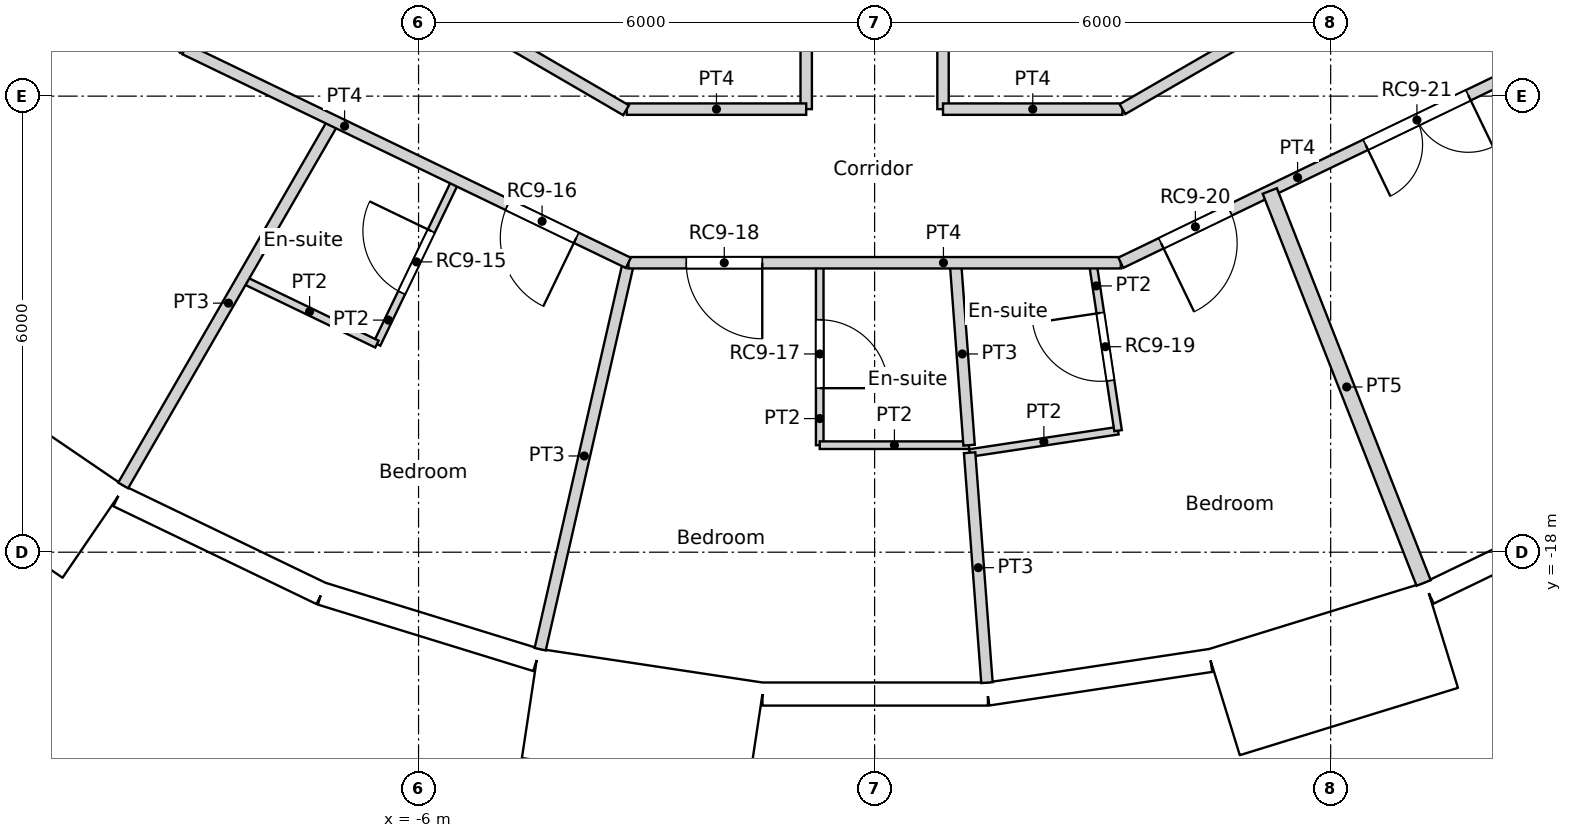
"""IFC4 building model, lengths in metres.
Left out: names, types, materials, properties, quantities, classifications, styles, units other than length and angle.
Written with IfcOpenShell. Run it as: python <this file> out.ifc"""

import sys

from ifc_helpers import new_model, si_unit, direction, frame, frame_2d, origin, origin_2d, place, context, subcontext, project, spatial, rectangle, circle, extrude, element, fill, save


model = new_model("IFC4")
c1 = context("Model", 3, precision=1e-05, world=origin(), true_north=direction((0.0, 1.0)))
c2 = subcontext(c1, "Body", "Model", "MODEL_VIEW")
j1 = project(units=[si_unit("LENGTHUNIT", "METRE"), si_unit("PLANEANGLEUNIT", "RADIAN")], contexts=[c1])
p1 = place(None, origin())
s1 = spatial("IfcSite", under=j1, at=p1, CompositionType="ELEMENT")
p2 = place(p1, origin())
s2 = spatial("IfcBuilding", under=s1, at=p2, CompositionType="ELEMENT")
p3 = place(p2, frame((0.0, 0.0, 316.2)))
s3 = spatial("IfcBuildingStorey", under=s2, at=p3, CompositionType="ELEMENT", Elevation=316.2)
for number, where, z_axis, x_axis in (
    (1, (-9.411, -16.301, 0.0), (0.0, 0.0, 1.0), (1.0, 0.0, 0.0)),
    (2, (-4.188, -18.35, 0.0), (0.0, 0.0, 1.0), (1.0, 0.0, 0.0)),
    (3, (1.406, -18.77, 0.0), (0.0, 0.0, 1.0), (1.0, 0.0, 0.0)),
    (4, (6.876, -17.521, 0.0), (0.0, 0.0, 1.0), (1.0, 0.0, 0.0)),
):
    element("IfcColumn", number, at=place(p3, frame(where, z_axis=z_axis, x_axis=x_axis)), inside=s3, PredefinedType="COLUMN", context=c2, shape_type="SweptSolid", body=[
        extrude(circle(Radius=0.45, at=origin_2d()), origin(), (0.0, 0.0, 1.0), 3.6),
    ])
p4 = place(p3, frame((-12.754, -16.044, -0.35), z_axis=(0.0, 0.0, 1.0), x_axis=(0.826246281157, -0.563309047392, 0.0)))
e5 = element("IfcWall", 5, at=p4, inside=s3, PredefinedType="ELEMENTEDWALL", context=c2, shape_type="SweptSolid", body=[
    extrude(rectangle(XDim=3.0, YDim=1.45, at=frame_2d((1.5, 0.0))), origin(), (0.0, 0.0, 1.0), 3.6),
])
p5 = place(p4, frame((1.5, 0.0, 1.9)))
e6 = element("IfcOpeningElement", 6, at=p5, cuts=e5, PredefinedType="OPENING", context=c2, shape_type="SweptSolid", body=[
    extrude(circle(Radius=0.9, at=origin_2d()), frame((0.0, 0.735, 0.0), z_axis=(0.0, -1.0, 0.0), x_axis=(1.0, 0.0, 0.0)), (0.0, 0.0, 1.0), 1.47),
])
p6 = place(p3, frame((-9.947, -17.259, 0.0), z_axis=(0.0, 0.0, 1.0), x_axis=(0.900939615635, -0.433944476838, 0.0)))
e7 = element("IfcWall", 7, at=p6, inside=s3, PredefinedType="SOLIDWALL", context=c2, shape_type="SweptSolid", body=[
    extrude(rectangle(XDim=2.962, YDim=0.3, at=frame_2d((1.481, 0.0))), origin(), (0.0, 0.0, 1.0), 3.25),
])
p7 = place(p6, frame((1.481, 0.0, 1.55)))
e8 = element("IfcOpeningElement", 8, at=p7, cuts=e7, PredefinedType="OPENING", context=c2, shape_type="SweptSolid", body=[
    extrude(circle(Radius=0.9, at=origin_2d()), frame((0.0, 0.16, 0.0), z_axis=(0.0, -1.0, 0.0), x_axis=(1.0, 0.0, 0.0)), (0.0, 0.0, 1.0), 0.32),
])
p8 = place(p3, frame((-7.278, -18.545, 0.0), z_axis=(0.0, 0.0, 1.0), x_axis=(0.95558635705, -0.294711238707, 0.0)))
e9 = element("IfcWall", 9, at=p8, inside=s3, PredefinedType="SOLIDWALL", context=c2, shape_type="SweptSolid", body=[
    extrude(rectangle(XDim=2.962, YDim=0.3, at=frame_2d((1.481, 0.0))), origin(), (0.0, 0.0, 1.0), 3.25),
])
p9 = place(p8, frame((1.481, 0.0, 1.55)))
e10 = element("IfcOpeningElement", 10, at=p9, cuts=e9, PredefinedType="OPENING", context=c2, shape_type="SweptSolid", body=[
    extrude(circle(Radius=0.9, at=origin_2d()), frame((0.0, 0.16, 0.0), z_axis=(0.0, -1.0, 0.0), x_axis=(1.0, 0.0, 0.0)), (0.0, 0.0, 1.0), 0.32),
])
p10 = place(p3, frame((-4.53, -19.989, -0.35), z_axis=(0.0, 0.0, 1.0), x_axis=(0.988836445254, -0.149004981587, 0.0)))
e11 = element("IfcWall", 11, at=p10, inside=s3, PredefinedType="ELEMENTEDWALL", context=c2, shape_type="SweptSolid", body=[
    extrude(rectangle(XDim=3.0, YDim=1.45, at=frame_2d((1.5, 0.0))), origin(), (0.0, 0.0, 1.0), 3.6),
])
p11 = place(p10, frame((1.5, 0.0, 1.9)))
e12 = element("IfcOpeningElement", 12, at=p11, cuts=e11, PredefinedType="OPENING", context=c2, shape_type="SweptSolid", body=[
    extrude(circle(Radius=0.9, at=origin_2d()), frame((0.0, 0.735, 0.0), z_axis=(0.0, -1.0, 0.0), x_axis=(1.0, 0.0, 0.0)), (0.0, 0.0, 1.0), 1.47),
])
p12 = place(p3, frame((-1.473, -19.866, 0.0), z_axis=(0.0, 0.0, 1.0), x_axis=(1.0, 0.0, 0.0)))
e13 = element("IfcWall", 13, at=p12, inside=s3, PredefinedType="SOLIDWALL", context=c2, shape_type="SweptSolid", body=[
    extrude(rectangle(XDim=2.962, YDim=0.3, at=frame_2d((1.481, 0.0))), origin(), (0.0, 0.0, 1.0), 3.25),
])
p13 = place(p12, frame((1.481, 0.0, 1.55)))
e14 = element("IfcOpeningElement", 14, at=p13, cuts=e13, PredefinedType="OPENING", context=c2, shape_type="SweptSolid", body=[
    extrude(circle(Radius=0.9, at=origin_2d()), frame((0.0, 0.16, 0.0), z_axis=(0.0, -1.0, 0.0), x_axis=(1.0, 0.0, 0.0)), (0.0, 0.0, 1.0), 0.32),
])
p14 = place(p3, frame((1.489, -19.866, 0.0), z_axis=(0.0, 0.0, 1.0), x_axis=(0.988835775663, 0.149009425104, 0.0)))
e15 = element("IfcWall", 15, at=p14, inside=s3, PredefinedType="SOLIDWALL", context=c2, shape_type="SweptSolid", body=[
    extrude(rectangle(XDim=2.962, YDim=0.3, at=frame_2d((1.481, 0.0))), origin(), (0.0, 0.0, 1.0), 3.25),
])
p15 = place(p14, frame((1.481, 0.0, 1.55)))
e16 = element("IfcOpeningElement", 16, at=p15, cuts=e15, PredefinedType="OPENING", context=c2, shape_type="SweptSolid", body=[
    extrude(circle(Radius=0.9, at=origin_2d()), frame((0.0, 0.16, 0.0), z_axis=(0.0, -1.0, 0.0), x_axis=(1.0, 0.0, 0.0)), (0.0, 0.0, 1.0), 0.32),
])
p16 = place(p3, frame((4.592, -19.975, -0.35), z_axis=(0.0, 0.0, 1.0), x_axis=(0.955571139978, 0.294760574774, 0.0)))
e17 = element("IfcWall", 17, at=p16, inside=s3, PredefinedType="ELEMENTEDWALL", context=c2, shape_type="SweptSolid", body=[
    extrude(rectangle(XDim=3.0, YDim=1.45, at=frame_2d((1.5, 0.0))), origin(), (0.0, 0.0, 1.0), 3.6),
])
p17 = place(p16, frame((1.5, 0.0, 1.9)))
e18 = element("IfcOpeningElement", 18, at=p17, cuts=e17, PredefinedType="OPENING", context=c2, shape_type="SweptSolid", body=[
    extrude(circle(Radius=0.9, at=origin_2d()), frame((0.0, 0.735, 0.0), z_axis=(0.0, -1.0, 0.0), x_axis=(1.0, 0.0, 0.0)), (0.0, 0.0, 1.0), 1.47),
])
p18 = place(p3, frame((7.292, -18.538, 0.0), z_axis=(0.0, 0.0, 1.0), x_axis=(0.90095513435, 0.433912255978, 0.0)))
e19 = element("IfcWall", 19, at=p18, inside=s3, PredefinedType="SOLIDWALL", context=c2, shape_type="SweptSolid", body=[
    extrude(rectangle(XDim=2.962, YDim=0.3, at=frame_2d((1.481, 0.0))), origin(), (0.0, 0.0, 1.0), 3.25),
])
p19 = place(p18, frame((1.481, 0.0, 1.55)))
e20 = element("IfcOpeningElement", 20, at=p19, cuts=e19, PredefinedType="OPENING", context=c2, shape_type="SweptSolid", body=[
    extrude(circle(Radius=0.9, at=origin_2d()), frame((0.0, 0.16, 0.0), z_axis=(0.0, -1.0, 0.0), x_axis=(1.0, 0.0, 0.0)), (0.0, 0.0, 1.0), 0.32),
])
p20 = place(p3, frame((-9.092, -8.8, 0.0), z_axis=(0.0, 0.0, 1.0), x_axis=(0.864470922103, -0.502682827277, 0.0)))
e21 = element("IfcWall", 21, at=p20, inside=s3, PredefinedType="PARTITIONING", context=c2, shape_type="SweptSolid", body=[
    extrude(rectangle(XDim=6.735, YDim=0.15, at=frame_2d((3.368, 0.0))), origin(), (0.0, 0.0, 1.0), 3.25),
])
p21 = place(p3, frame((-11.3, -8.596, 0.0), z_axis=(0.0, 0.0, 1.0), x_axis=(0.623165080354, -0.782090328944, 0.0)))
e22 = element("IfcWall", 22, at=p21, inside=s3, PredefinedType="PARTITIONING", context=c2, shape_type="SweptSolid", body=[
    extrude(rectangle(XDim=3.564, YDim=0.15, at=frame_2d((1.782, 0.0))), origin(), (0.0, 0.0, 1.0), 3.25),
])
p22 = place(p3, frame((-3.261, -12.171, 0.0), z_axis=(0.0, 0.0, 1.0), x_axis=(1.0, 0.0, 0.0)))
e23 = element("IfcWall", 23, at=p22, inside=s3, PredefinedType="PARTITIONING", context=c2, shape_type="SweptSolid", body=[
    extrude(rectangle(XDim=2.361, YDim=0.15, at=frame_2d((1.181, 0.0))), origin(), (0.0, 0.0, 1.0), 3.25),
])
for number, where, z_axis, x_axis in (
    (24, (-0.9, -12.171, 0.0), (0.0, 0.0, 1.0), (0.0, 1.0, 0.0)),
    (25, (0.9, -12.171, 0.0), (0.0, 0.0, 1.0), (0.0, 1.0, 0.0)),
):
    element("IfcWall", number, at=place(p3, frame(where, z_axis=z_axis, x_axis=x_axis)), inside=s3, PredefinedType="PARTITIONING", context=c2, shape_type="SweptSolid", body=[
        extrude(rectangle(XDim=3.371, YDim=0.15, at=frame_2d((1.686, 0.0))), origin(), (0.0, 0.0, 1.0), 3.25),
    ])
p23 = place(p3, frame((0.9, -12.171, 0.0), z_axis=(0.0, 0.0, 1.0), x_axis=(1.0, 0.0, 0.0)))
e26 = element("IfcWall", 26, at=p23, inside=s3, PredefinedType="PARTITIONING", context=c2, shape_type="SweptSolid", body=[
    extrude(rectangle(XDim=2.361, YDim=0.15, at=frame_2d((1.181, 0.0))), origin(), (0.0, 0.0, 1.0), 3.25),
])
p24 = place(p3, frame((3.261, -12.171, 0.0), z_axis=(0.0, 0.0, 1.0), x_axis=(0.866066809554, 0.499928276245, 0.0)))
e27 = element("IfcWall", 27, at=p24, inside=s3, PredefinedType="PARTITIONING", context=c2, shape_type="SweptSolid", body=[
    extrude(rectangle(XDim=6.743, YDim=0.15, at=frame_2d((3.371, 0.0))), origin(), (0.0, 0.0, 1.0), 3.25),
])
p25 = place(p3, frame((-9.076, -11.381, 0.0), z_axis=(0.0, 0.0, 1.0), x_axis=(0.900851590682, -0.434127183629, 0.0)))
e28 = element("IfcWall", 28, at=p25, inside=s3, PredefinedType="PARTITIONING", context=c2, shape_type="SweptSolid", body=[
    extrude(rectangle(XDim=6.479, YDim=0.15, at=frame_2d((3.239, 0.0))), origin(), (0.0, 0.0, 1.0), 3.25),
])
p26 = place(p25, frame((4.719, 0.0, 0.0)))
e29 = element("IfcOpeningElement", 29, at=p26, cuts=e28, PredefinedType="OPENING", context=c2, shape_type="SweptSolid", body=[
    extrude(rectangle(XDim=1.0, YDim=2.1, at=frame_2d((0.5, 1.05))), frame((0.0, 0.075, 0.0), z_axis=(0.0, -1.0, 0.0), x_axis=(1.0, 0.0, 0.0)), (0.0, 0.0, 1.0), 0.15),
])
p27 = place(p3, frame((-3.239, -14.192, 0.0), z_axis=(0.0, 0.0, 1.0), x_axis=(1.0, 0.0, 0.0)))
e30 = element("IfcWall", 30, at=p27, inside=s3, PredefinedType="PARTITIONING", context=c2, shape_type="SweptSolid", body=[
    extrude(rectangle(XDim=6.478, YDim=0.15, at=frame_2d((3.239, 0.0))), origin(), (0.0, 0.0, 1.0), 3.25),
])
p28 = place(p27, frame((0.761, 0.0, 0.0)))
e31 = element("IfcOpeningElement", 31, at=p28, cuts=e30, PredefinedType="OPENING", context=c2, shape_type="SweptSolid", body=[
    extrude(rectangle(XDim=1.0, YDim=2.1, at=frame_2d((0.5, 1.05))), frame((0.0, 0.075, 0.0), z_axis=(0.0, -1.0, 0.0), x_axis=(1.0, 0.0, 0.0)), (0.0, 0.0, 1.0), 0.15),
])
p29 = place(p3, frame((3.239, -14.192, 0.0), z_axis=(0.0, 0.0, 1.0), x_axis=(0.900851590682, 0.434127183629, 0.0)))
e32 = element("IfcWall", 32, at=p29, inside=s3, PredefinedType="PARTITIONING", context=c2, shape_type="SweptSolid", body=[
    extrude(rectangle(XDim=6.479, YDim=0.15, at=frame_2d((3.239, 0.0))), origin(), (0.0, 0.0, 1.0), 3.25),
])
p30 = place(p29, frame((0.589, 0.0, 0.0)))
e33 = element("IfcOpeningElement", 33, at=p30, cuts=e32, PredefinedType="OPENING", context=c2, shape_type="SweptSolid", body=[
    extrude(rectangle(XDim=1.0, YDim=2.1, at=frame_2d((0.5, 1.05))), frame((0.0, 0.075, 0.0), z_axis=(0.0, -1.0, 0.0), x_axis=(1.0, 0.0, 0.0)), (0.0, 0.0, 1.0), 0.15),
])
p31 = place(p29, frame((3.575, 0.0, 0.0)))
e34 = element("IfcOpeningElement", 34, at=p31, cuts=e32, PredefinedType="OPENING", context=c2, shape_type="SweptSolid", body=[
    extrude(rectangle(XDim=1.5, YDim=2.1, at=frame_2d((0.75, 1.05))), frame((0.0, 0.075, 0.0), z_axis=(0.0, -1.0, 0.0), x_axis=(1.0, 0.0, 0.0)), (0.0, 0.0, 1.0), 0.15),
])
p32 = place(p3, frame((-9.886, -17.122, 0.0), z_axis=(0.0, 0.0, 1.0), x_axis=(0.500073446025, 0.865982995549, 0.0)))
e35 = element("IfcWall", 35, at=p32, inside=s3, PredefinedType="PARTITIONING", context=c2, shape_type="SweptSolid", body=[
    extrude(rectangle(XDim=5.539, YDim=0.15, at=frame_2d((2.77, 0.0))), origin(), (0.0, 0.0, 1.0), 3.25),
])
p33 = place(p3, frame((-8.319, -14.409, 0.0), z_axis=(0.0, 0.0, 1.0), x_axis=(0.900936932599, -0.433950047216, 0.0)))
e36 = element("IfcWall", 36, at=p33, inside=s3, PredefinedType="PARTITIONING", context=c2, shape_type="SweptSolid", body=[
    extrude(rectangle(XDim=1.966, YDim=0.1, at=frame_2d((0.983, 0.0))), origin(), (0.0, 0.0, 1.0), 3.25),
])
p34 = place(p3, frame((-6.548, -15.262, 0.0), z_axis=(0.0, 0.0, 1.0), x_axis=(0.433855388624, 0.900982520231, 0.0)))
e37 = element("IfcWall", 37, at=p34, inside=s3, PredefinedType="PARTITIONING", context=c2, shape_type="SweptSolid", body=[
    extrude(rectangle(XDim=2.399, YDim=0.1, at=frame_2d((1.2, 0.0))), origin(), (0.0, 0.0, 1.0), 3.25),
])
p35 = place(p34, frame((0.75, 0.0, 0.0)))
e38 = element("IfcOpeningElement", 38, at=p35, cuts=e37, PredefinedType="OPENING", context=c2, shape_type="SweptSolid", body=[
    extrude(rectangle(XDim=0.9, YDim=2.04, at=frame_2d((0.45, 1.02))), frame((0.0, 0.05, 0.0), z_axis=(0.0, -1.0, 0.0), x_axis=(1.0, 0.0, 0.0)), (0.0, 0.0, 1.0), 0.1),
])
p36 = place(p3, frame((-4.4, -19.276, 0.0), z_axis=(0.0, 0.0, 1.0), x_axis=(0.222612505682, 0.974907007008, 0.0)))
e39 = element("IfcWall", 39, at=p36, inside=s3, PredefinedType="PARTITIONING", context=c2, shape_type="SweptSolid", body=[
    extrude(rectangle(XDim=5.215, YDim=0.15, at=frame_2d((2.607, 0.0))), origin(), (0.0, 0.0, 1.0), 3.25),
])
p37 = place(p3, frame((-0.722, -16.592, 0.0), z_axis=(0.0, 0.0, 1.0), x_axis=(0.0, 1.0, 0.0)))
e40 = element("IfcWall", 40, at=p37, inside=s3, PredefinedType="PARTITIONING", context=c2, shape_type="SweptSolid", body=[
    extrude(rectangle(XDim=2.4, YDim=0.1, at=frame_2d((1.2, 0.0))), origin(), (0.0, 0.0, 1.0), 3.25),
])
p38 = place(p37, frame((0.75, 0.0, 0.0)))
e41 = element("IfcOpeningElement", 41, at=p38, cuts=e40, PredefinedType="OPENING", context=c2, shape_type="SweptSolid", body=[
    extrude(rectangle(XDim=0.9, YDim=2.04, at=frame_2d((0.45, 1.02))), frame((0.0, 0.05, 0.0), z_axis=(0.0, -1.0, 0.0), x_axis=(1.0, 0.0, 0.0)), (0.0, 0.0, 1.0), 0.1),
])
p39 = place(p3, frame((-0.722, -16.592, 0.0), z_axis=(0.0, 0.0, 1.0), x_axis=(1.0, 0.0, 0.0)))
e42 = element("IfcWall", 42, at=p39, inside=s3, PredefinedType="PARTITIONING", context=c2, shape_type="SweptSolid", body=[
    extrude(rectangle(XDim=1.965, YDim=0.1, at=frame_2d((0.982, 0.0))), origin(), (0.0, 0.0, 1.0), 3.25),
])
p40 = place(p3, frame((1.25, -16.691, 0.0), z_axis=(0.0, 0.0, 1.0), x_axis=(0.075164061246, -0.99717118084, 0.0)))
e43 = element("IfcWall", 43, at=p40, inside=s3, PredefinedType="PARTITIONING", context=c2, shape_type="SweptSolid", body=[
    extrude(rectangle(XDim=3.034, YDim=0.15, at=frame_2d((1.517, 0.0))), origin(), (0.0, 0.0, 1.0), 3.25),
])
p41 = place(p3, frame((1.064, -14.192, 0.0), z_axis=(0.0, 0.0, 1.0), x_axis=(0.074353677934, -0.997231934195, 0.0)))
e44 = element("IfcWall", 44, at=p41, inside=s3, PredefinedType="PARTITIONING", context=c2, shape_type="SweptSolid", body=[
    extrude(rectangle(XDim=2.407, YDim=0.15, at=frame_2d((1.203, 0.0))), origin(), (0.0, 0.0, 1.0), 3.25),
])
p42 = place(p3, frame((1.251, -16.695, 0.0), z_axis=(0.0, 0.0, 1.0), x_axis=(0.988831780565, 0.149035934407, 0.0)))
e45 = element("IfcWall", 45, at=p42, inside=s3, PredefinedType="PARTITIONING", context=c2, shape_type="SweptSolid", body=[
    extrude(rectangle(XDim=1.974, YDim=0.1, at=frame_2d((0.987, 0.0))), origin(), (0.0, 0.0, 1.0), 3.25),
])
p43 = place(p3, frame((2.87, -14.192, 0.0), z_axis=(0.0, 0.0, 1.0), x_axis=(0.148960349288, -0.988843169739, 0.0)))
e46 = element("IfcWall", 46, at=p43, inside=s3, PredefinedType="PARTITIONING", context=c2, shape_type="SweptSolid", body=[
    extrude(rectangle(XDim=2.234, YDim=0.1, at=frame_2d((1.117, 0.0))), origin(), (0.0, 0.0, 1.0), 3.25),
])
p44 = place(p43, frame((0.667, 0.0, 0.0)))
e47 = element("IfcOpeningElement", 47, at=p44, cuts=e46, PredefinedType="OPENING", context=c2, shape_type="SweptSolid", body=[
    extrude(rectangle(XDim=0.9, YDim=2.04, at=frame_2d((0.45, 1.02))), frame((0.0, 0.05, 0.0), z_axis=(0.0, -1.0, 0.0), x_axis=(1.0, 0.0, 0.0)), (0.0, 0.0, 1.0), 0.1),
])
p45 = place(p3, frame((5.199, -13.248, 0.0), z_axis=(0.0, 0.0, 1.0), x_axis=(0.365334662456, -0.930876245485, 0.0)))
e48 = element("IfcWall", 48, at=p45, inside=s3, PredefinedType="PARTITIONING", context=c2, shape_type="SweptSolid", body=[
    extrude(rectangle(XDim=5.54, YDim=0.2, at=frame_2d((2.77, 0.0))), origin(), (0.0, 0.0, 1.0), 3.25),
])
p46 = place(p5, origin())
e49 = element("IfcWindow", 49, at=p46, inside=s3, PartitioningType="SINGLE_PANEL", PredefinedType="WINDOW", context=c2, shape_type="SweptSolid", body=[
    extrude(circle(Radius=0.9, at=origin_2d()), frame((0.0, 0.695, 0.0), z_axis=(0.0, -1.0, 0.0), x_axis=(1.0, 0.0, 0.0)), (0.0, 0.0, 1.0), 0.1),
])
fill(e6, e49)
p47 = place(p7, origin())
e50 = element("IfcWindow", 50, at=p47, inside=s3, PartitioningType="SINGLE_PANEL", PredefinedType="WINDOW", context=c2, shape_type="SweptSolid", body=[
    extrude(circle(Radius=0.9, at=origin_2d()), frame((0.0, 0.12, 0.0), z_axis=(0.0, -1.0, 0.0), x_axis=(1.0, 0.0, 0.0)), (0.0, 0.0, 1.0), 0.1),
])
fill(e8, e50)
p48 = place(p9, origin())
e51 = element("IfcWindow", 51, at=p48, inside=s3, PartitioningType="SINGLE_PANEL", PredefinedType="WINDOW", context=c2, shape_type="SweptSolid", body=[
    extrude(circle(Radius=0.9, at=origin_2d()), frame((0.0, 0.12, 0.0), z_axis=(0.0, -1.0, 0.0), x_axis=(1.0, 0.0, 0.0)), (0.0, 0.0, 1.0), 0.1),
])
fill(e10, e51)
p49 = place(p11, origin())
e52 = element("IfcWindow", 52, at=p49, inside=s3, PartitioningType="SINGLE_PANEL", PredefinedType="WINDOW", context=c2, shape_type="SweptSolid", body=[
    extrude(circle(Radius=0.9, at=origin_2d()), frame((0.0, 0.695, 0.0), z_axis=(0.0, -1.0, 0.0), x_axis=(1.0, 0.0, 0.0)), (0.0, 0.0, 1.0), 0.1),
])
fill(e12, e52)
p50 = place(p13, origin())
e53 = element("IfcWindow", 53, at=p50, inside=s3, PartitioningType="SINGLE_PANEL", PredefinedType="WINDOW", context=c2, shape_type="SweptSolid", body=[
    extrude(circle(Radius=0.9, at=origin_2d()), frame((0.0, 0.12, 0.0), z_axis=(0.0, -1.0, 0.0), x_axis=(1.0, 0.0, 0.0)), (0.0, 0.0, 1.0), 0.1),
])
fill(e14, e53)
p51 = place(p15, origin())
e54 = element("IfcWindow", 54, at=p51, inside=s3, PartitioningType="SINGLE_PANEL", PredefinedType="WINDOW", context=c2, shape_type="SweptSolid", body=[
    extrude(circle(Radius=0.9, at=origin_2d()), frame((0.0, 0.12, 0.0), z_axis=(0.0, -1.0, 0.0), x_axis=(1.0, 0.0, 0.0)), (0.0, 0.0, 1.0), 0.1),
])
fill(e16, e54)
p52 = place(p17, origin())
e55 = element("IfcWindow", 55, at=p52, inside=s3, PartitioningType="SINGLE_PANEL", PredefinedType="WINDOW", context=c2, shape_type="SweptSolid", body=[
    extrude(circle(Radius=0.9, at=origin_2d()), frame((0.0, 0.695, 0.0), z_axis=(0.0, -1.0, 0.0), x_axis=(1.0, 0.0, 0.0)), (0.0, 0.0, 1.0), 0.1),
])
fill(e18, e55)
p53 = place(p19, origin())
e56 = element("IfcWindow", 56, at=p53, inside=s3, PartitioningType="SINGLE_PANEL", PredefinedType="WINDOW", context=c2, shape_type="SweptSolid", body=[
    extrude(circle(Radius=0.9, at=origin_2d()), frame((0.0, 0.12, 0.0), z_axis=(0.0, -1.0, 0.0), x_axis=(1.0, 0.0, 0.0)), (0.0, 0.0, 1.0), 0.1),
])
fill(e20, e56)
p54 = place(p35, origin())
e57 = element("IfcDoor", 57, at=p54, inside=s3, OperationType="SINGLE_SWING_RIGHT", PredefinedType="DOOR", context=c2, shape_type="SweptSolid", body=[
    extrude(rectangle(XDim=0.9, YDim=2.04, at=frame_2d((0.45, 1.02))), frame((0.0, 0.025, 0.0), z_axis=(0.0, -1.0, 0.0), x_axis=(1.0, 0.0, 0.0)), (0.0, 0.0, 1.0), 0.05),
])
fill(e38, e57)
p55 = place(p26, origin())
e58 = element("IfcDoor", 58, at=p55, inside=s3, OperationType="SINGLE_SWING_LEFT", PredefinedType="DOOR", context=c2, shape_type="SweptSolid", body=[
    extrude(rectangle(XDim=1.0, YDim=2.1, at=frame_2d((0.5, 1.05))), frame((0.0, 0.025, 0.0), z_axis=(0.0, -1.0, 0.0), x_axis=(1.0, 0.0, 0.0)), (0.0, 0.0, 1.0), 0.05),
])
fill(e29, e58)
p56 = place(p38, origin())
e59 = element("IfcDoor", 59, at=p56, inside=s3, OperationType="SINGLE_SWING_RIGHT", PredefinedType="DOOR", context=c2, shape_type="SweptSolid", body=[
    extrude(rectangle(XDim=0.9, YDim=2.04, at=frame_2d((0.45, 1.02))), frame((0.0, 0.025, 0.0), z_axis=(0.0, -1.0, 0.0), x_axis=(1.0, 0.0, 0.0)), (0.0, 0.0, 1.0), 0.05),
])
fill(e41, e59)
p57 = place(p28, origin())
e60 = element("IfcDoor", 60, at=p57, inside=s3, OperationType="SINGLE_SWING_LEFT", PredefinedType="DOOR", context=c2, shape_type="SweptSolid", body=[
    extrude(rectangle(XDim=1.0, YDim=2.1, at=frame_2d((0.5, 1.05))), frame((0.0, 0.025, 0.0), z_axis=(0.0, -1.0, 0.0), x_axis=(1.0, 0.0, 0.0)), (0.0, 0.0, 1.0), 0.05),
])
fill(e31, e60)
p58 = place(p44, origin())
e61 = element("IfcDoor", 61, at=p58, inside=s3, OperationType="SINGLE_SWING_RIGHT", PredefinedType="DOOR", context=c2, shape_type="SweptSolid", body=[
    extrude(rectangle(XDim=0.9, YDim=2.04, at=frame_2d((0.45, 1.02))), frame((0.0, 0.025, 0.0), z_axis=(0.0, -1.0, 0.0), x_axis=(1.0, 0.0, 0.0)), (0.0, 0.0, 1.0), 0.05),
])
fill(e47, e61)
p59 = place(p30, origin())
e62 = element("IfcDoor", 62, at=p59, inside=s3, OperationType="SINGLE_SWING_RIGHT", PredefinedType="DOOR", context=c2, shape_type="SweptSolid", body=[
    extrude(rectangle(XDim=1.0, YDim=2.1, at=frame_2d((0.5, 1.05))), frame((0.0, 0.025, 0.0), z_axis=(0.0, -1.0, 0.0), x_axis=(1.0, 0.0, 0.0)), (0.0, 0.0, 1.0), 0.05),
])
fill(e33, e62)
p60 = place(p31, origin())
e63 = element("IfcDoor", 63, at=p60, inside=s3, OperationType="DOUBLE_DOOR_SINGLE_SWING", PredefinedType="DOOR", context=c2, shape_type="SweptSolid", body=[
    extrude(rectangle(XDim=1.5, YDim=2.1, at=frame_2d((0.75, 1.05))), frame((0.0, 0.025, 0.0), z_axis=(0.0, -1.0, 0.0), x_axis=(1.0, 0.0, 0.0)), (0.0, 0.0, 1.0), 0.05),
])
fill(e34, e63)
save(model, sys.argv[1])
